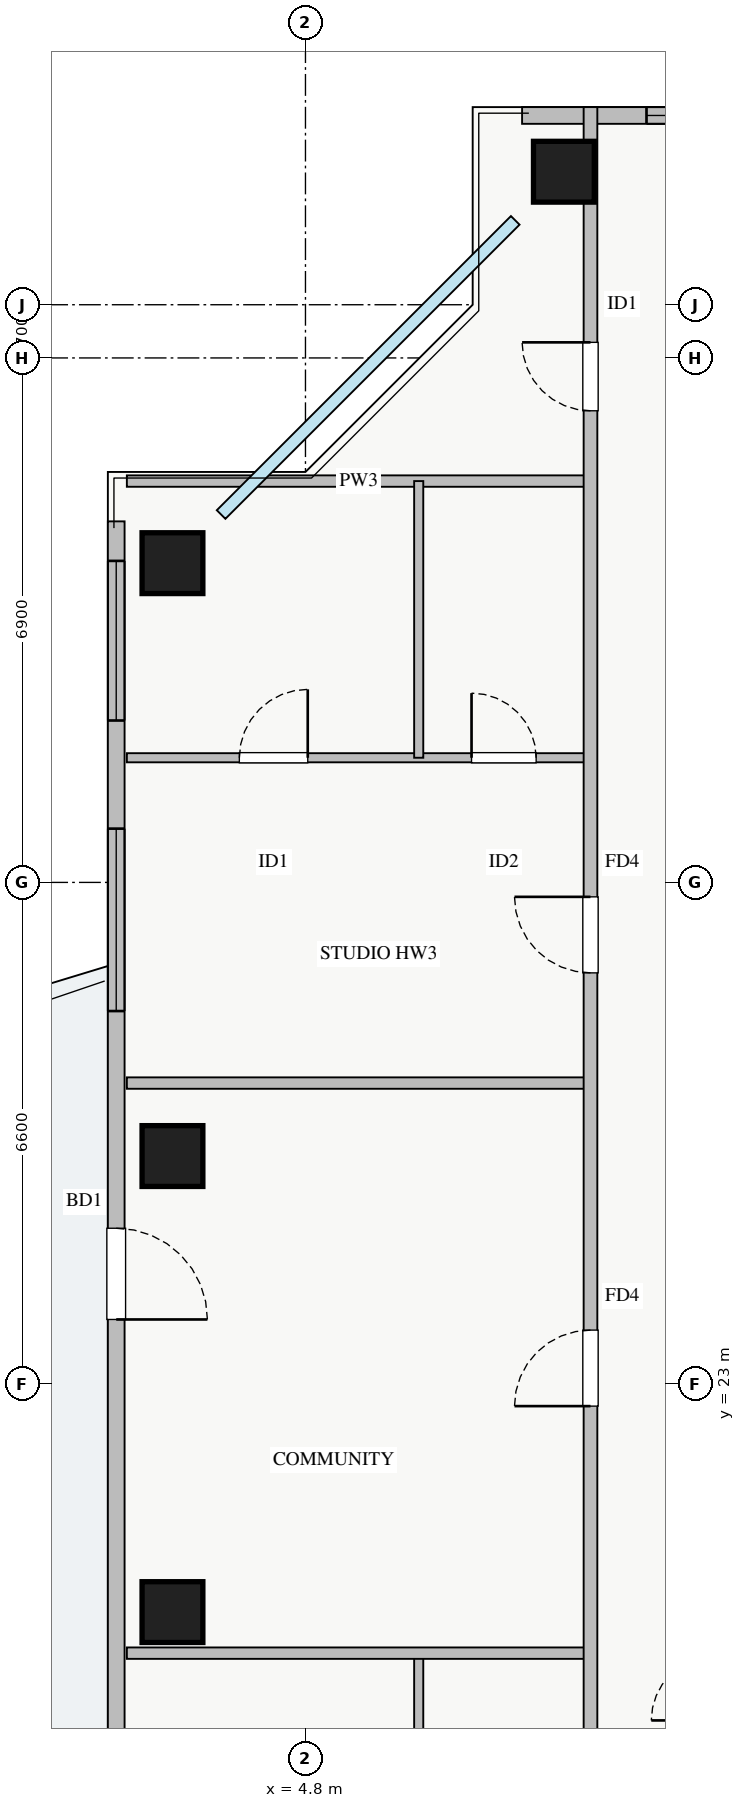
"""IFC4 building model, lengths in metres.
Left out: names, types, materials, properties, quantities, classifications, styles, units other than length and angle.
Written with IfcOpenShell. Run it as: python <this file> out.ifc"""

import sys

from ifc_helpers import new_model, si_unit, direction, frame, frame_2d, origin, origin_2d, place, context, subcontext, project, spatial, rectangle, extrude, source, transform, mapped, element, fill, save


model = new_model("IFC4")
c1 = context("Model", 3, precision=1e-05, world=origin(), true_north=direction((0.0, 1.0)))
c2 = subcontext(c1, "Body", "Model", "MODEL_VIEW")
j1 = project(units=[si_unit("LENGTHUNIT", "METRE"), si_unit("PLANEANGLEUNIT", "RADIAN")], contexts=[c1])
p1 = place(None, origin())
s1 = spatial("IfcSite", under=j1, at=p1, CompositionType="ELEMENT")
p2 = place(p1, origin())
s2 = spatial("IfcBuilding", under=s1, at=p2, CompositionType="ELEMENT")
p3 = place(p2, frame((0.0, 0.0, 200.25)))
s3 = spatial("IfcBuildingStorey", under=s2, at=p3, CompositionType="ELEMENT", Elevation=200.25)
m1 = source(origin(), c2, "Body", "SweptSolid", [
    extrude(rectangle(XDim=0.8, YDim=0.8, at=origin_2d()), origin(), (0.0, 0.0, 1.0), 3.25),
])
for number, where, z_axis, x_axis in (
    (1, (8.2, 38.95, 0.0), (0.0, 0.0, 1.0), (1.0, 0.0, 0.0)),
    (2, (3.05, 33.8, 0.0), (0.0, 0.0, 1.0), (1.0, 0.0, 0.0)),
    (3, (3.05, 26.0, 0.0), (0.0, 0.0, 1.0), (1.0, 0.0, 0.0)),
    (4, (3.05, 20.0, 0.0), (0.0, 0.0, 1.0), (1.0, 0.0, 0.0)),
):
    element("IfcColumn", number, at=place(p3, frame(where, z_axis=z_axis, x_axis=x_axis)), inside=s3, PredefinedType="COLUMN", context=c2, shape_type="MappedRepresentation", body=[
        mapped(m1, transform((0.0, 0.0, 0.0), x_axis=(1.0, 0.0, 0.0), y_axis=(0.0, 1.0, 0.0), z_axis=(0.0, 0.0, 1.0), scale=1.0)),
    ])
p4 = place(p3, frame((7.65, 39.69, 0.0), z_axis=(0.0, 0.0, 1.0), x_axis=(1.0, 0.0, 0.0)))
e5 = element("IfcWall", 5, at=p4, inside=s3, PredefinedType="STANDARD", context=c2, shape_type="SweptSolid", body=[
    extrude(rectangle(XDim=22.7, YDim=0.22, at=frame_2d((11.35, 0.0))), origin(), (0.0, 0.0, 1.0), 2.61),
])
p5 = place(p4, frame((12.2, 0.0, 0.0)))
e6 = element("IfcOpeningElement", 6, at=p5, cuts=e5, PredefinedType="OPENING", context=c2, shape_type="SweptSolid", body=[
    extrude(rectangle(XDim=1.2, YDim=2.1, at=frame_2d((0.6, 1.05))), frame((0.0, 0.12, 0.0), z_axis=(0.0, -1.0, 0.0), x_axis=(1.0, 0.0, 0.0)), (0.0, 0.0, 1.0), 0.24),
])
p6 = place(p4, frame((1.637, 0.0, 0.9)))
e7 = element("IfcOpeningElement", 7, at=p6, cuts=e5, PredefinedType="OPENING", context=c2, shape_type="SweptSolid", body=[
    extrude(rectangle(XDim=2.4, YDim=1.48, at=frame_2d((1.2, 0.74))), frame((0.0, 0.12, 0.0), z_axis=(0.0, -1.0, 0.0), x_axis=(1.0, 0.0, 0.0)), (0.0, 0.0, 1.0), 0.24),
])
p7 = place(p4, frame((7.612, 0.0, 0.9)))
e8 = element("IfcOpeningElement", 8, at=p7, cuts=e5, PredefinedType="OPENING", context=c2, shape_type="SweptSolid", body=[
    extrude(rectangle(XDim=1.8, YDim=1.45, at=frame_2d((0.9, 0.725))), frame((0.0, 0.12, 0.0), z_axis=(0.0, -1.0, 0.0), x_axis=(1.0, 0.0, 0.0)), (0.0, 0.0, 1.0), 0.24),
])
p8 = place(p4, frame((18.812, 0.0, 0.9)))
e9 = element("IfcOpeningElement", 9, at=p8, cuts=e5, PredefinedType="OPENING", context=c2, shape_type="SweptSolid", body=[
    extrude(rectangle(XDim=2.1, YDim=1.48, at=frame_2d((1.05, 0.74))), frame((0.0, 0.12, 0.0), z_axis=(0.0, -1.0, 0.0), x_axis=(1.0, 0.0, 0.0)), (0.0, 0.0, 1.0), 0.24),
])
p9 = place(p3, frame((2.31, 11.65, 0.0), z_axis=(0.0, 0.0, 1.0), x_axis=(0.0, 1.0, 0.0)))
e10 = element("IfcWall", 10, at=p9, inside=s3, PredefinedType="STANDARD", context=c2, shape_type="SweptSolid", body=[
    extrude(rectangle(XDim=22.7, YDim=0.22, at=frame_2d((11.35, 0.0))), origin(), (0.0, 0.0, 1.0), 2.61),
])
p10 = place(p9, frame((12.2, 0.0, 0.0)))
e11 = element("IfcOpeningElement", 11, at=p10, cuts=e10, PredefinedType="OPENING", context=c2, shape_type="SweptSolid", body=[
    extrude(rectangle(XDim=1.2, YDim=2.1, at=frame_2d((0.6, 1.05))), frame((0.0, 0.12, 0.0), z_axis=(0.0, -1.0, 0.0), x_axis=(1.0, 0.0, 0.0)), (0.0, 0.0, 1.0), 0.24),
])
p11 = place(p9, frame((0.8, 0.0, 0.9)))
e12 = element("IfcOpeningElement", 12, at=p11, cuts=e10, PredefinedType="OPENING", context=c2, shape_type="SweptSolid", body=[
    extrude(rectangle(XDim=2.4, YDim=1.5, at=frame_2d((1.2, 0.75))), frame((0.0, 0.12, 0.0), z_axis=(0.0, -1.0, 0.0), x_axis=(1.0, 0.0, 0.0)), (0.0, 0.0, 1.0), 0.24),
])
p12 = place(p9, frame((20.08, 0.0, 0.9)))
e13 = element("IfcOpeningElement", 13, at=p12, cuts=e10, PredefinedType="OPENING", context=c2, shape_type="SweptSolid", body=[
    extrude(rectangle(XDim=2.1, YDim=1.5, at=frame_2d((1.05, 0.75))), frame((0.0, 0.12, 0.0), z_axis=(0.0, -1.0, 0.0), x_axis=(1.0, 0.0, 0.0)), (0.0, 0.0, 1.0), 0.24),
])
p13 = place(p9, frame((16.258, 0.0, 0.9)))
e14 = element("IfcOpeningElement", 14, at=p13, cuts=e10, PredefinedType="OPENING", context=c2, shape_type="SweptSolid", body=[
    extrude(rectangle(XDim=2.4, YDim=1.5, at=frame_2d((1.2, 0.75))), frame((0.0, 0.12, 0.0), z_axis=(0.0, -1.0, 0.0), x_axis=(1.0, 0.0, 0.0)), (0.0, 0.0, 1.0), 0.24),
])
p14 = place(p3, frame((2.45, 34.88, 0.0), z_axis=(0.0, 0.0, 1.0), x_axis=(1.0, 0.0, 0.0)))
e15 = element("IfcWall", 15, at=p14, inside=s3, PredefinedType="PARTITIONING", context=c2, shape_type="SweptSolid", body=[
    extrude(rectangle(XDim=6.1, YDim=0.15, at=frame_2d((3.05, 0.0))), origin(), (0.0, 0.0, 1.0), 3.07),
])
p15 = place(p3, frame((6.29, 15.62, 0.0), z_axis=(0.0, 0.0, 1.0), x_axis=(0.0, 1.0, 0.0)))
e16 = element("IfcWall", 16, at=p15, inside=s3, PredefinedType="PLUMBINGWALL", context=c2, shape_type="SweptSolid", body=[
    extrude(rectangle(XDim=3.84, YDim=0.12, at=frame_2d((1.92, 0.0))), origin(), (0.0, 0.0, 1.0), 3.07),
])
p16 = place(p3, frame((2.45, 19.46, 0.0), z_axis=(0.0, 0.0, 1.0), x_axis=(1.0, 0.0, 0.0)))
e17 = element("IfcWall", 17, at=p16, inside=s3, PredefinedType="PARTITIONING", context=c2, shape_type="SweptSolid", body=[
    extrude(rectangle(XDim=6.1, YDim=0.15, at=frame_2d((3.05, 0.0))), origin(), (0.0, 0.0, 1.0), 3.07),
])
p17 = place(p3, frame((2.45, 31.24, 0.0), z_axis=(0.0, 0.0, 1.0), x_axis=(1.0, 0.0, 0.0)))
e18 = element("IfcWall", 18, at=p17, inside=s3, PredefinedType="PLUMBINGWALL", context=c2, shape_type="SweptSolid", body=[
    extrude(rectangle(XDim=6.1, YDim=0.12, at=frame_2d((3.05, 0.0))), origin(), (0.0, 0.0, 1.0), 3.07),
])
p18 = place(p17, frame((1.48, 0.0, 0.0)))
e19 = element("IfcOpeningElement", 19, at=p18, cuts=e18, PredefinedType="OPENING", context=c2, shape_type="SweptSolid", body=[
    extrude(rectangle(XDim=0.9, YDim=2.05, at=frame_2d((0.45, 1.025))), frame((0.0, 0.07, 0.0), z_axis=(0.0, -1.0, 0.0), x_axis=(1.0, 0.0, 0.0)), (0.0, 0.0, 1.0), 0.14),
])
p19 = place(p17, frame((4.535, 0.0, 0.0)))
e20 = element("IfcOpeningElement", 20, at=p19, cuts=e18, PredefinedType="OPENING", context=c2, shape_type="SweptSolid", body=[
    extrude(rectangle(XDim=0.85, YDim=2.05, at=frame_2d((0.425, 1.025))), frame((0.0, 0.07, 0.0), z_axis=(0.0, -1.0, 0.0), x_axis=(1.0, 0.0, 0.0)), (0.0, 0.0, 1.0), 0.14),
])
p20 = place(p3, frame((6.29, 31.24, 0.0), z_axis=(0.0, 0.0, 1.0), x_axis=(0.0, 1.0, 0.0)))
e21 = element("IfcWall", 21, at=p20, inside=s3, PredefinedType="PLUMBINGWALL", context=c2, shape_type="SweptSolid", body=[
    extrude(rectangle(XDim=3.64, YDim=0.12, at=frame_2d((1.82, 0.0))), origin(), (0.0, 0.0, 1.0), 3.07),
])
p21 = place(p3, frame((2.45, 26.96, 0.0), z_axis=(0.0, 0.0, 1.0), x_axis=(1.0, 0.0, 0.0)))
e22 = element("IfcWall", 22, at=p21, inside=s3, PredefinedType="PARTITIONING", context=c2, shape_type="SweptSolid", body=[
    extrude(rectangle(XDim=6.1, YDim=0.15, at=frame_2d((3.05, 0.0))), origin(), (0.0, 0.0, 1.0), 3.07),
])
p22 = place(p3, frame((8.55, 6.2, 0.0), z_axis=(0.0, 0.0, 1.0), x_axis=(0.0, 1.0, 0.0)))
e23 = element("IfcWall", 23, at=p22, inside=s3, PredefinedType="PARTITIONING", context=c2, shape_type="SweptSolid", body=[
    extrude(rectangle(XDim=33.6, YDim=0.18, at=frame_2d((16.8, 0.0))), origin(), (0.0, 0.0, 1.0), 3.07),
])
p23 = place(p22, frame((29.605, 0.0, 0.0)))
e24 = element("IfcOpeningElement", 24, at=p23, cuts=e23, PredefinedType="OPENING", context=c2, shape_type="SweptSolid", body=[
    extrude(rectangle(XDim=0.9, YDim=2.05, at=frame_2d((0.45, 1.025))), frame((0.0, 0.1, 0.0), z_axis=(0.0, -1.0, 0.0), x_axis=(1.0, 0.0, 0.0)), (0.0, 0.0, 1.0), 0.2),
])
p24 = place(p22, frame((2.92, 0.0, 0.0)))
e25 = element("IfcOpeningElement", 25, at=p24, cuts=e23, PredefinedType="OPENING", context=c2, shape_type="SweptSolid", body=[
    extrude(rectangle(XDim=0.9, YDim=2.05, at=frame_2d((0.45, 1.025))), frame((0.0, 0.1, 0.0), z_axis=(0.0, -1.0, 0.0), x_axis=(1.0, 0.0, 0.0)), (0.0, 0.0, 1.0), 0.2),
])
p25 = place(p22, frame((6.48, 0.0, 0.0)))
e26 = element("IfcOpeningElement", 26, at=p25, cuts=e23, PredefinedType="OPENING", context=c2, shape_type="SweptSolid", body=[
    extrude(rectangle(XDim=1.0, YDim=2.05, at=frame_2d((0.5, 1.025))), frame((0.0, 0.1, 0.0), z_axis=(0.0, -1.0, 0.0), x_axis=(1.0, 0.0, 0.0)), (0.0, 0.0, 1.0), 0.2),
])
p26 = place(p22, frame((16.51, 0.0, 0.0)))
e27 = element("IfcOpeningElement", 27, at=p26, cuts=e23, PredefinedType="OPENING", context=c2, shape_type="SweptSolid", body=[
    extrude(rectangle(XDim=1.0, YDim=2.05, at=frame_2d((0.5, 1.025))), frame((0.0, 0.1, 0.0), z_axis=(0.0, -1.0, 0.0), x_axis=(1.0, 0.0, 0.0)), (0.0, 0.0, 1.0), 0.2),
])
p27 = place(p22, frame((22.21, 0.0, 0.0)))
e28 = element("IfcOpeningElement", 28, at=p27, cuts=e23, PredefinedType="OPENING", context=c2, shape_type="SweptSolid", body=[
    extrude(rectangle(XDim=1.0, YDim=2.05, at=frame_2d((0.5, 1.025))), frame((0.0, 0.1, 0.0), z_axis=(0.0, -1.0, 0.0), x_axis=(1.0, 0.0, 0.0)), (0.0, 0.0, 1.0), 0.2),
])
m2 = source(origin(), c2, "Body", "SweptSolid", [
    extrude(rectangle(XDim=2.4, YDim=1.48, at=frame_2d((1.2, 0.74))), frame((0.0, 0.03, 0.0), z_axis=(0.0, -1.0, 0.0), x_axis=(1.0, 0.0, 0.0)), (0.0, 0.0, 1.0), 0.06),
])
p28 = place(p6, origin())
e29 = element("IfcWindow", 29, at=p28, inside=s3, PartitioningType="TRIPLE_PANEL_VERTICAL", PredefinedType="WINDOW", context=c2, shape_type="MappedRepresentation", body=[
    mapped(m2, transform((0.0, 0.0, 0.0), x_axis=(1.0, 0.0, 0.0), y_axis=(0.0, 1.0, 0.0), z_axis=(0.0, 0.0, 1.0), scale=1.0)),
])
fill(e7, e29)
m3 = source(origin(), c2, "Body", "SweptSolid", [
    extrude(rectangle(XDim=1.2, YDim=2.1, at=frame_2d((0.6, 1.05))), frame((0.0, 0.025, 0.0), z_axis=(0.0, -1.0, 0.0), x_axis=(1.0, 0.0, 0.0)), (0.0, 0.0, 1.0), 0.05),
])
p29 = place(p10, frame((1.2, 0.0, 0.0), z_axis=(0.0, 0.0, 1.0), x_axis=(-1.0, 0.0, 0.0)))
e30 = element("IfcDoor", 30, at=p29, inside=s3, OperationType="SINGLE_SWING_LEFT", PredefinedType="DOOR", context=c2, shape_type="MappedRepresentation", body=[
    mapped(m3, transform((0.0, 0.0, 0.0), x_axis=(1.0, 0.0, 0.0), y_axis=(0.0, 1.0, 0.0), z_axis=(0.0, 0.0, 1.0), scale=1.0)),
])
fill(e11, e30)
m4 = source(origin(), c2, "Body", "SweptSolid", [
    extrude(rectangle(XDim=2.1, YDim=1.5, at=frame_2d((1.05, 0.75))), frame((0.0, 0.03, 0.0), z_axis=(0.0, -1.0, 0.0), x_axis=(1.0, 0.0, 0.0)), (0.0, 0.0, 1.0), 0.06),
])
p30 = place(p12, origin())
e31 = element("IfcWindow", 31, at=p30, inside=s3, PartitioningType="TRIPLE_PANEL_VERTICAL", PredefinedType="WINDOW", context=c2, shape_type="MappedRepresentation", body=[
    mapped(m4, transform((0.0, 0.0, 0.0), x_axis=(1.0, 0.0, 0.0), y_axis=(0.0, 1.0, 0.0), z_axis=(0.0, 0.0, 1.0), scale=1.0)),
])
fill(e13, e31)
m5 = source(origin(), c2, "Body", "SweptSolid", [
    extrude(rectangle(XDim=0.9, YDim=2.05, at=frame_2d((0.45, 1.025))), frame((0.0, 0.025, 0.0), z_axis=(0.0, -1.0, 0.0), x_axis=(1.0, 0.0, 0.0)), (0.0, 0.0, 1.0), 0.05),
])
p31 = place(p18, origin())
e32 = element("IfcDoor", 32, at=p31, inside=s3, OperationType="SINGLE_SWING_RIGHT", PredefinedType="DOOR", context=c2, shape_type="MappedRepresentation", body=[
    mapped(m5, transform((0.0, 0.0, 0.0), x_axis=(1.0, 0.0, 0.0), y_axis=(0.0, 1.0, 0.0), z_axis=(0.0, 0.0, 1.0), scale=1.0)),
])
fill(e19, e32)
m6 = source(origin(), c2, "Body", "SweptSolid", [
    extrude(rectangle(XDim=0.85, YDim=2.05, at=frame_2d((0.425, 1.025))), frame((0.0, 0.025, 0.0), z_axis=(0.0, -1.0, 0.0), x_axis=(1.0, 0.0, 0.0)), (0.0, 0.0, 1.0), 0.05),
])
p32 = place(p19, origin())
e33 = element("IfcDoor", 33, at=p32, inside=s3, OperationType="SINGLE_SWING_LEFT", PredefinedType="DOOR", context=c2, shape_type="MappedRepresentation", body=[
    mapped(m6, transform((0.0, 0.0, 0.0), x_axis=(1.0, 0.0, 0.0), y_axis=(0.0, 1.0, 0.0), z_axis=(0.0, 0.0, 1.0), scale=1.0)),
])
fill(e20, e33)
p33 = place(p23, origin())
e34 = element("IfcDoor", 34, at=p33, inside=s3, OperationType="SINGLE_SWING_RIGHT", PredefinedType="DOOR", context=c2, shape_type="MappedRepresentation", body=[
    mapped(m5, transform((0.0, 0.0, 0.0), x_axis=(1.0, 0.0, 0.0), y_axis=(0.0, 1.0, 0.0), z_axis=(0.0, 0.0, 1.0), scale=1.0)),
])
fill(e24, e34)
m7 = source(origin(), c2, "Body", "SweptSolid", [
    extrude(rectangle(XDim=1.0, YDim=2.05, at=frame_2d((0.5, 1.025))), frame((0.0, 0.025, 0.0), z_axis=(0.0, -1.0, 0.0), x_axis=(1.0, 0.0, 0.0)), (0.0, 0.0, 1.0), 0.05),
])
p34 = place(p26, origin())
e35 = element("IfcDoor", 35, at=p34, inside=s3, OperationType="SINGLE_SWING_LEFT", PredefinedType="DOOR", context=c2, shape_type="MappedRepresentation", body=[
    mapped(m7, transform((0.0, 0.0, 0.0), x_axis=(1.0, 0.0, 0.0), y_axis=(0.0, 1.0, 0.0), z_axis=(0.0, 0.0, 1.0), scale=1.0)),
])
fill(e27, e35)
p35 = place(p27, origin())
e36 = element("IfcDoor", 36, at=p35, inside=s3, OperationType="SINGLE_SWING_RIGHT", PredefinedType="DOOR", context=c2, shape_type="MappedRepresentation", body=[
    mapped(m7, transform((0.0, 0.0, 0.0), x_axis=(1.0, 0.0, 0.0), y_axis=(0.0, 1.0, 0.0), z_axis=(0.0, 0.0, 1.0), scale=1.0)),
])
fill(e28, e36)
m8 = source(origin(), c2, "Body", "SweptSolid", [
    extrude(rectangle(XDim=2.4, YDim=1.5, at=frame_2d((1.2, 0.75))), frame((0.0, 0.03, 0.0), z_axis=(0.0, -1.0, 0.0), x_axis=(1.0, 0.0, 0.0)), (0.0, 0.0, 1.0), 0.06),
])
p36 = place(p13, origin())
e37 = element("IfcWindow", 37, at=p36, inside=s3, PartitioningType="TRIPLE_PANEL_VERTICAL", PredefinedType="WINDOW", context=c2, shape_type="MappedRepresentation", body=[
    mapped(m8, transform((0.0, 0.0, 0.0), x_axis=(1.0, 0.0, 0.0), y_axis=(0.0, 1.0, 0.0), z_axis=(0.0, 0.0, 1.0), scale=1.0)),
])
fill(e14, e37)
save(model, sys.argv[1])
